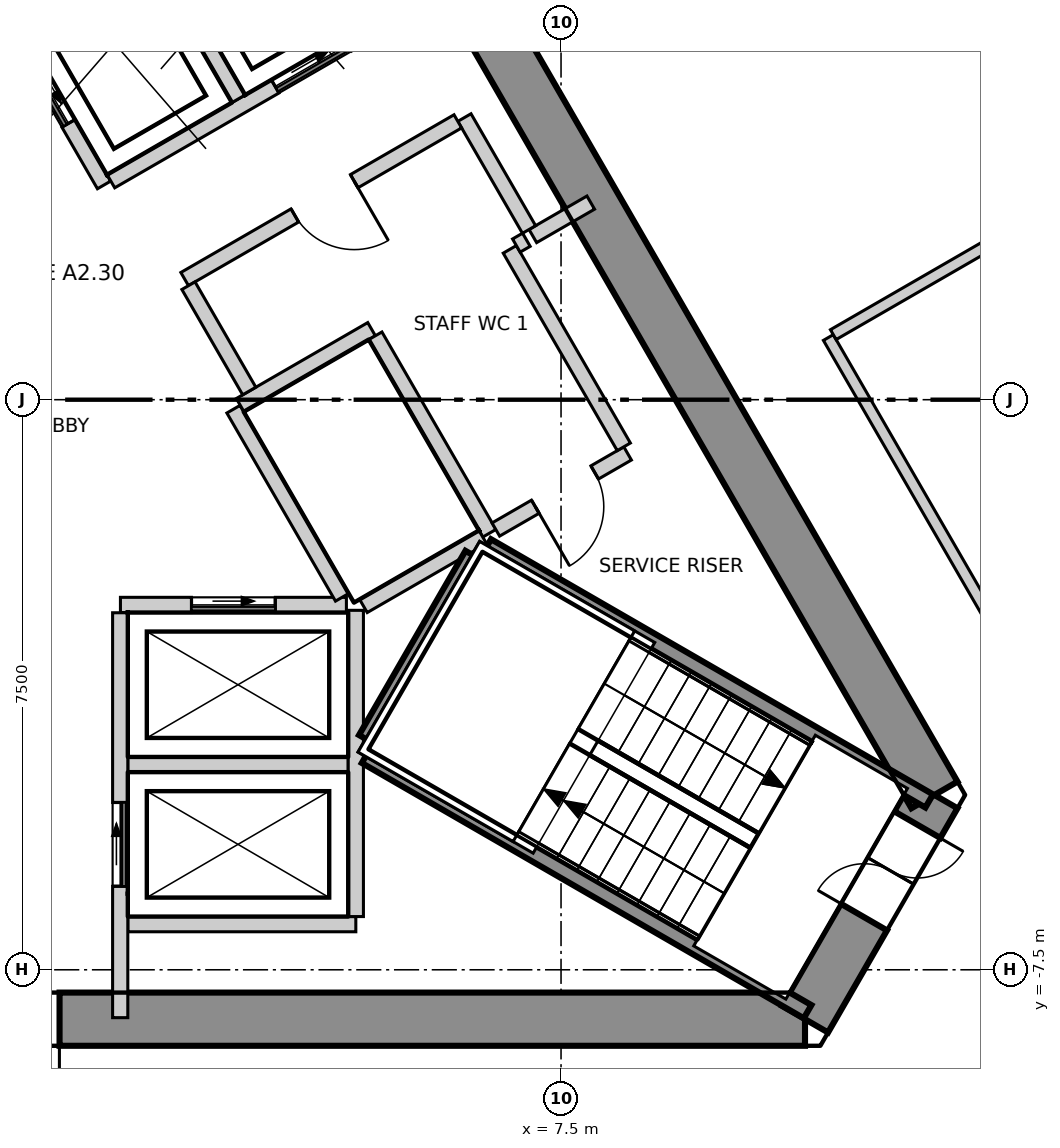
"""IFC4 building model, lengths in metres.
Left out: names, types, materials, properties, quantities, classifications, styles, units other than length and angle.
Written with IfcOpenShell. Run it as: python <this file> out.ifc"""

import sys

from ifc_helpers import new_model, si_unit, direction, frame, frame_2d, origin, place, context, subcontext, project, spatial, polyline, rectangle, outline, extrude, element, fill, save


model = new_model("IFC4")
c1 = context("Model", 3, precision=1e-05, world=origin(), true_north=direction((0.0, 1.0)))
c2 = subcontext(c1, "Body", "Model", "MODEL_VIEW")
j1 = project(units=[si_unit("LENGTHUNIT", "METRE"), si_unit("PLANEANGLEUNIT", "RADIAN")], contexts=[c1])
p1 = place(None, origin())
s1 = spatial("IfcSite", under=j1, at=p1, CompositionType="ELEMENT")
p2 = place(p1, origin())
s2 = spatial("IfcBuilding", under=s1, at=p2, CompositionType="ELEMENT")
p3 = place(p2, frame((0.0, 0.0, 255.8)))
s3 = spatial("IfcBuildingStorey", under=s2, at=p3, CompositionType="ELEMENT", Elevation=255.8)
p4 = place(p3, frame((-10.71, -8.15, -0.6), z_axis=(0.0, 0.0, 1.0), x_axis=(1.0, 0.0, 0.0)))
e1 = element("IfcWall", 1, at=p4, inside=s3, PredefinedType="SHEAR", context=c2, shape_type="SweptSolid", body=[
    extrude(outline(polyline([(-0.202, -0.35), (1.782, -0.35), (3.766, -0.35), (5.75, -0.35), (7.734, -0.35), (9.718, -0.35), (11.702, -0.35), (13.686, -0.35), (15.67, -0.35), (17.654, -0.35), (19.638, -0.35), (21.622, -0.35), (21.218, 0.35), (19.307, 0.35), (17.397, 0.35), (15.486, 0.35), (13.576, 0.35), (11.665, 0.35), (9.755, 0.35), (7.844, 0.35), (5.934, 0.35), (4.023, 0.35), (2.113, 0.35), (0.202, 0.35), (-0.202, -0.35)])), origin(), (0.0, 0.0, 1.0), 6.3),
])
p5 = place(p4, frame((9.81, 0.0, 0.6)))
e2 = element("IfcOpeningElement", 2, at=p5, cuts=e1, PredefinedType="OPENING", context=c2, shape_type="SweptSolid", body=[
    extrude(rectangle(XDim=1.8, YDim=2.1, at=frame_2d((0.9, 1.05))), frame((0.0, 0.36, 0.0), z_axis=(0.0, -1.0, 0.0), x_axis=(1.0, 0.0, 0.0)), (0.0, 0.0, 1.0), 0.72),
])
p6 = place(p3, frame((10.71, -8.15, -0.6), z_axis=(0.0, 0.0, 1.0), x_axis=(0.49999337185, 0.866029230515, 0.0)))
e3 = element("IfcWall", 3, at=p6, inside=s3, PredefinedType="SHEAR", context=c2, shape_type="SweptSolid", body=[
    extrude(outline(polyline([(-0.202, -0.35), (1.703, -0.35), (3.608, -0.35), (3.204, 0.35), (1.703, 0.35), (0.202, 0.35), (-0.202, -0.35)])), origin(), (0.0, 0.0, 1.0), 6.3),
])
p7 = place(p6, frame((1.553, 0.0, 0.6)))
e4 = element("IfcOpeningElement", 4, at=p7, cuts=e3, PredefinedType="OPENING", context=c2, shape_type="SweptSolid", body=[
    extrude(rectangle(XDim=1.4, YDim=2.1, at=frame_2d((0.7, 1.05))), frame((0.0, 0.36, 0.0), z_axis=(0.0, -1.0, 0.0), x_axis=(1.0, 0.0, 0.0)), (0.0, 0.0, 1.0), 0.72),
])
p8 = place(p3, frame((12.413, -5.2, -0.6), z_axis=(0.0, 0.0, 1.0), x_axis=(-0.500011533395, 0.866018744874, 0.0)))
e5 = element("IfcWall", 5, at=p8, inside=s3, PredefinedType="SHEAR", context=c2, shape_type="SweptSolid", body=[
    extrude(outline(polyline([(-0.202, -0.35), (1.782, -0.35), (3.766, -0.35), (5.75, -0.35), (7.734, -0.35), (9.718, -0.35), (11.702, -0.35), (13.686, -0.35), (15.67, -0.35), (17.654, -0.35), (19.638, -0.35), (21.622, -0.35), (21.218, 0.35), (19.307, 0.35), (17.397, 0.35), (15.486, 0.35), (13.576, 0.35), (11.665, 0.35), (9.755, 0.35), (7.844, 0.35), (5.934, 0.35), (4.023, 0.35), (2.113, 0.35), (0.202, 0.35), (-0.202, -0.35)])), origin(), (0.0, 0.0, 1.0), 6.3),
])
p9 = place(p8, frame((16.465, 0.0, 0.6)))
e6 = element("IfcOpeningElement", 6, at=p9, cuts=e5, PredefinedType="OPENING", context=c2, shape_type="SweptSolid", body=[
    extrude(rectangle(XDim=0.9, YDim=2.1, at=frame_2d((0.45, 1.05))), frame((0.0, 0.36, 0.0), z_axis=(0.0, -1.0, 0.0), x_axis=(1.0, 0.0, 0.0)), (0.0, 0.0, 1.0), 0.72),
])
p10 = place(p3, frame((11.017, 0.818, 0.0), z_axis=(0.0, 0.0, 1.0), x_axis=(0.499929268946, -0.866066236526, 0.0)))
e7 = element("IfcWall", 7, at=p10, inside=s3, PredefinedType="PARTITIONING", context=c2, shape_type="SweptSolid", body=[
    extrude(rectangle(XDim=6.949, YDim=0.15, at=frame_2d((3.474, 0.0))), origin(), (0.0, 0.0, 1.0), 5.7),
])
p11 = place(p3, frame((11.082, 0.856, 0.0), z_axis=(0.0, 0.0, 1.0), x_axis=(0.866054133163, 0.499950235956, 0.0)))
e8 = element("IfcWall", 8, at=p11, inside=s3, PredefinedType="PARTITIONING", context=c2, shape_type="SweptSolid", body=[
    extrude(rectangle(XDim=6.897, YDim=0.15, at=frame_2d((3.448, 0.0))), origin(), (0.0, 0.0, 1.0), 5.7),
])
p12 = place(p11, frame((2.811, 0.0, 0.0)))
e9 = element("IfcOpeningElement", 9, at=p12, cuts=e8, PredefinedType="OPENING", context=c2, shape_type="SweptSolid", body=[
    extrude(rectangle(XDim=1.2, YDim=2.1, at=frame_2d((0.6, 1.05))), frame((0.0, 0.085, 0.0), z_axis=(0.0, -1.0, 0.0), x_axis=(1.0, 0.0, 0.0)), (0.0, 0.0, 1.0), 0.17),
])
p13 = place(p3, frame((1.8, -4.8, 0.0), z_axis=(0.0, 0.0, 1.0), x_axis=(1.0, 0.0, 0.0)))
e10 = element("IfcWall", 10, at=p13, inside=s3, PredefinedType="SOLIDWALL", context=c2, shape_type="SweptSolid", body=[
    extrude(rectangle(XDim=2.9, YDim=0.2, at=frame_2d((1.45, 0.0))), origin(), (0.0, 0.0, 1.0), 5.7),
])
p14 = place(p3, frame((1.8, -6.9, 0.0), z_axis=(0.0, 0.0, 1.0), x_axis=(1.0, 0.0, 0.0)))
e11 = element("IfcWall", 11, at=p14, inside=s3, PredefinedType="SOLIDWALL", context=c2, shape_type="SweptSolid", body=[
    extrude(rectangle(XDim=3.0, YDim=0.2, at=frame_2d((1.5, 0.0))), origin(), (0.0, 0.0, 1.0), 5.7),
])
p15 = place(p3, frame((1.703, -2.7, 0.0), z_axis=(0.0, 0.0, 1.0), x_axis=(1.0, 0.0, 0.0)))
e12 = element("IfcWall", 12, at=p15, inside=s3, PredefinedType="SOLIDWALL", context=c2, shape_type="SweptSolid", body=[
    extrude(rectangle(XDim=2.973, YDim=0.2, at=frame_2d((1.487, 0.0))), origin(), (0.0, 0.0, 1.0), 5.7),
])
p16 = place(p15, frame((0.936, 0.0, 0.0)))
e13 = element("IfcOpeningElement", 13, at=p16, cuts=e12, PredefinedType="OPENING", context=c2, shape_type="SweptSolid", body=[
    extrude(rectangle(XDim=1.1, YDim=2.1, at=frame_2d((0.55, 1.05))), frame((0.0, 0.11, 0.0), z_axis=(0.0, -1.0, 0.0), x_axis=(1.0, 0.0, 0.0)), (0.0, 0.0, 1.0), 0.22),
])
p17 = place(p3, frame((0.0, 5.4, 0.0), z_axis=(0.0, 0.0, 1.0), x_axis=(0.500103862429, -0.865965430478, 0.0)))
e14 = element("IfcWall", 14, at=p17, inside=s3, PredefinedType="SOLIDWALL", context=c2, shape_type="SweptSolid", body=[
    extrude(rectangle(XDim=2.973, YDim=0.2, at=frame_2d((1.487, 0.0))), origin(), (0.0, 0.0, 1.0), 5.7),
])
p18 = place(p17, frame((0.937, 0.0, 0.0)))
e15 = element("IfcOpeningElement", 15, at=p18, cuts=e14, PredefinedType="OPENING", context=c2, shape_type="SweptSolid", body=[
    extrude(rectangle(XDim=1.1, YDim=2.1, at=frame_2d((0.55, 1.05))), frame((0.0, 0.11, 0.0), z_axis=(0.0, -1.0, 0.0), x_axis=(1.0, 0.0, 0.0)), (0.0, 0.0, 1.0), 0.22),
])
p19 = place(p3, frame((3.19, -0.125, 0.0), z_axis=(0.0, 0.0, 1.0), x_axis=(0.499988658015, -0.866031951983, 0.0)))
e16 = element("IfcWall", 16, at=p19, inside=s3, PredefinedType="SOLIDWALL", context=c2, shape_type="SweptSolid", body=[
    extrude(rectangle(XDim=2.858, YDim=0.2, at=frame_2d((1.429, 0.0))), origin(), (0.0, 0.0, 1.0), 5.7),
])
p20 = place(p3, frame((1.578, 2.874, 0.0), z_axis=(0.0, 0.0, 1.0), x_axis=(0.866045911672, 0.499964477614, 0.0)))
e17 = element("IfcWall", 17, at=p20, inside=s3, PredefinedType="SOLIDWALL", context=c2, shape_type="SweptSolid", body=[
    extrude(rectangle(XDim=5.327, YDim=0.2, at=frame_2d((2.663, 0.0))), origin(), (0.0, 0.0, 1.0), 5.7),
])
p21 = place(p20, frame((2.496, 0.0, 0.0)))
e18 = element("IfcOpeningElement", 18, at=p21, cuts=e17, PredefinedType="OPENING", context=c2, shape_type="SweptSolid", body=[
    extrude(rectangle(XDim=1.1, YDim=2.1, at=frame_2d((0.55, 1.05))), frame((0.0, 0.11, 0.0), z_axis=(0.0, -1.0, 0.0), x_axis=(1.0, 0.0, 0.0)), (0.0, 0.0, 1.0), 0.22),
])
p22 = place(p3, frame((1.7, -8.13, 0.0), z_axis=(0.0, 0.0, 1.0), x_axis=(0.0, 1.0, 0.0)))
e19 = element("IfcWall", 19, at=p22, inside=s3, PredefinedType="SOLIDWALL", context=c2, shape_type="SweptSolid", body=[
    extrude(rectangle(XDim=5.327, YDim=0.2, at=frame_2d((2.664, 0.0))), origin(), (0.0, 0.0, 1.0), 5.7),
])
p23 = place(p22, frame((1.73, 0.0, 0.0)))
e20 = element("IfcOpeningElement", 20, at=p23, cuts=e19, PredefinedType="OPENING", context=c2, shape_type="SweptSolid", body=[
    extrude(rectangle(XDim=1.1, YDim=2.1, at=frame_2d((0.55, 1.05))), frame((0.0, 0.11, 0.0), z_axis=(0.0, -1.0, 0.0), x_axis=(1.0, 0.0, 0.0)), (0.0, 0.0, 1.0), 0.22),
])
p24 = place(p3, frame((4.8, -6.8, 0.0), z_axis=(0.0, 0.0, 1.0), x_axis=(0.0, 1.0, 0.0)))
e21 = element("IfcWall", 21, at=p24, inside=s3, PredefinedType="SOLIDWALL", context=c2, shape_type="SweptSolid", body=[
    extrude(rectangle(XDim=4.029, YDim=0.2, at=frame_2d((2.015, 0.0))), origin(), (0.0, 0.0, 1.0), 5.7),
])
p25 = place(p3, frame((3.278, -0.071, 0.0), z_axis=(0.0, 0.0, 1.0), x_axis=(0.865855657918, 0.500293893279, 0.0)))
e22 = element("IfcWall", 22, at=p25, inside=s3, PredefinedType="SOLIDWALL", context=c2, shape_type="SweptSolid", body=[
    extrude(rectangle(XDim=1.997, YDim=0.2, at=frame_2d((0.999, 0.0))), origin(), (0.0, 0.0, 1.0), 5.7),
])
p26 = place(p3, frame((7.129, 2.153, 0.0), z_axis=(0.0, 0.0, 1.0), x_axis=(0.866083962871, 0.499898558967, 0.0)))
e23 = element("IfcWall", 23, at=p26, inside=s3, PredefinedType="SOLIDWALL", context=c2, shape_type="SweptSolid", body=[
    extrude(rectangle(XDim=0.88, YDim=0.2, at=frame_2d((0.44, 0.0))), origin(), (0.0, 0.0, 1.0), 5.7),
])
p27 = place(p3, frame((1.807, 6.47, 0.0), z_axis=(0.0, 0.0, 1.0), x_axis=(0.50012328804, -0.865954211699, 0.0)))
e24 = element("IfcWall", 24, at=p27, inside=s3, PredefinedType="SOLIDWALL", context=c2, shape_type="SweptSolid", body=[
    extrude(rectangle(XDim=2.9, YDim=0.2, at=frame_2d((1.45, 0.0))), origin(), (0.0, 0.0, 1.0), 5.7),
])
p28 = place(p3, frame((5.057, 0.841, 0.0), z_axis=(0.0, 0.0, 1.0), x_axis=(0.499990139034, -0.866031096941, 0.0)))
e25 = element("IfcWall", 25, at=p28, inside=s3, PredefinedType="SOLIDWALL", context=c2, shape_type="SweptSolid", body=[
    extrude(rectangle(XDim=3.0, YDim=0.2, at=frame_2d((1.5, 0.0))), origin(), (0.0, 0.0, 1.0), 5.7),
])
p29 = place(p3, frame((4.9, -2.714, 0.0), z_axis=(0.0, 0.0, 1.0), x_axis=(0.865846928409, 0.500309001083, 0.0)))
e26 = element("IfcWall", 26, at=p29, inside=s3, PredefinedType="SOLIDWALL", context=c2, shape_type="SweptSolid", body=[
    extrude(rectangle(XDim=1.813, YDim=0.2, at=frame_2d((0.907, 0.0))), origin(), (0.0, 0.0, 1.0), 5.7),
])
p30 = place(p3, frame((6.229, 3.712, 0.0), z_axis=(0.0, 0.0, 1.0), x_axis=(0.499875724984, -0.86609714211, 0.0)))
e27 = element("IfcWall", 27, at=p30, inside=s3, PredefinedType="SOLIDWALL", context=c2, shape_type="SweptSolid", body=[
    extrude(rectangle(XDim=1.701, YDim=0.2, at=frame_2d((0.85, 0.0))), origin(), (0.0, 0.0, 1.0), 5.7),
])
p31 = place(p3, frame((2.548, 1.587, 0.0), z_axis=(0.0, 0.0, 1.0), x_axis=(0.866004344652, 0.500036473714, 0.0)))
e28 = element("IfcWall", 28, at=p31, inside=s3, PredefinedType="SOLIDWALL", context=c2, shape_type="SweptSolid", body=[
    extrude(rectangle(XDim=4.15, YDim=0.2, at=frame_2d((2.075, 0.0))), origin(), (0.0, 0.0, 1.0), 5.7),
])
p32 = place(p31, frame((1.675, 0.0, 0.0)))
e29 = element("IfcOpeningElement", 29, at=p32, cuts=e28, PredefinedType="OPENING", context=c2, shape_type="SweptSolid", body=[
    extrude(rectangle(XDim=0.9, YDim=2.1, at=frame_2d((0.45, 1.05))), frame((0.0, 0.11, 0.0), z_axis=(0.0, -1.0, 0.0), x_axis=(1.0, 0.0, 0.0)), (0.0, 0.0, 1.0), 0.22),
])
p33 = place(p3, frame((2.598, 1.5, 0.0), z_axis=(0.0, 0.0, 1.0), x_axis=(0.499929347863, -0.866066190972, 0.0)))
e30 = element("IfcWall", 30, at=p33, inside=s3, PredefinedType="SOLIDWALL", context=c2, shape_type="SweptSolid", body=[
    extrude(rectangle(XDim=1.6, YDim=0.2, at=frame_2d((0.8, 0.0))), origin(), (0.0, 0.0, 1.0), 5.7),
])
p34 = place(p3, frame((6.642, -1.708, 0.0), z_axis=(0.0, 0.0, 1.0), x_axis=(0.866043441391, 0.499968756647, 0.0)))
e31 = element("IfcWall", 31, at=p34, inside=s3, PredefinedType="SOLIDWALL", context=c2, shape_type="SweptSolid", body=[
    extrude(rectangle(XDim=2.002, YDim=0.2, at=frame_2d((1.001, 0.0))), origin(), (0.0, 0.0, 1.0), 5.7),
])
p35 = place(p34, frame((0.601, 0.0, 0.0)))
e32 = element("IfcOpeningElement", 32, at=p35, cuts=e31, PredefinedType="OPENING", context=c2, shape_type="SweptSolid", body=[
    extrude(rectangle(XDim=0.9, YDim=2.1, at=frame_2d((0.45, 1.05))), frame((0.0, 0.11, 0.0), z_axis=(0.0, -1.0, 0.0), x_axis=(1.0, 0.0, 0.0)), (0.0, 0.0, 1.0), 0.22),
])
p36 = place(p3, frame((6.826, 1.978, 0.0), z_axis=(0.0, 0.0, 1.0), x_axis=(0.499990139034, -0.866031096941, 0.0)))
e33 = element("IfcWall", 33, at=p36, inside=s3, PredefinedType="SOLIDWALL", context=c2, shape_type="SweptSolid", body=[
    extrude(rectangle(XDim=3.0, YDim=0.2, at=frame_2d((1.5, 0.0))), origin(), (0.0, 0.0, 1.0), 5.7),
])
p37 = place(p3, frame((6.912, 2.028, 0.0), z_axis=(0.0, 0.0, 1.0), x_axis=(0.866559367082, 0.499074005857, 0.0)))
e34 = element("IfcWall", 34, at=p37, inside=s3, PredefinedType="SOLIDWALL", context=c2, shape_type="SweptSolid", body=[
    extrude(rectangle(XDim=0.152, YDim=0.2, at=frame_2d((0.076, 0.0))), origin(), (0.0, 0.0, 1.0), 5.7),
])
p38 = place(p3, frame((4.929, -4.693, 0.0), z_axis=(0.0, 0.0, 1.0), x_axis=(0.865983344943, -0.500072840975, 0.0)))
e35 = element("IfcWall", 35, at=p38, inside=s3, PredefinedType="SOLIDWALL", context=c2, shape_type="SweptSolid", body=[
    extrude(rectangle(XDim=6.715, YDim=0.2, at=frame_2d((3.357, 0.0))), origin(), (0.0, 0.0, 1.0), 5.7),
])
p39 = place(p3, frame((4.929, -4.462, 0.0), z_axis=(0.0, 0.0, 1.0), x_axis=(0.500200581029, 0.865909567298, 0.0)))
e36 = element("IfcWall", 36, at=p39, inside=s3, PredefinedType="SOLIDWALL", context=c2, shape_type="SweptSolid", body=[
    extrude(rectangle(XDim=2.799, YDim=0.2, at=frame_2d((1.399, 0.0))), origin(), (0.0, 0.0, 1.0), 5.7),
])
p40 = place(p3, frame((6.529, -1.922, 0.0), z_axis=(0.0, 0.0, 1.0), x_axis=(0.866046323291, -0.499963764601, 0.0)))
e37 = element("IfcWall", 37, at=p40, inside=s3, PredefinedType="SOLIDWALL", context=c2, shape_type="SweptSolid", body=[
    extrude(rectangle(XDim=6.714, YDim=0.2, at=frame_2d((3.357, 0.0))), origin(), (0.0, 0.0, 1.0), 5.7),
])
p41 = place(p16, origin())
e38 = element("IfcDoor", 38, at=p41, inside=s3, OperationType="SLIDING_TO_LEFT", PredefinedType="DOOR", context=c2, shape_type="SweptSolid", body=[
    extrude(rectangle(XDim=1.1, YDim=2.1, at=frame_2d((0.55, 1.05))), frame((0.0, 0.025, 0.0), z_axis=(0.0, -1.0, 0.0), x_axis=(1.0, 0.0, 0.0)), (0.0, 0.0, 1.0), 0.05),
])
fill(e13, e38)
p42 = place(p23, origin())
e39 = element("IfcDoor", 39, at=p42, inside=s3, OperationType="SLIDING_TO_LEFT", PredefinedType="DOOR", context=c2, shape_type="SweptSolid", body=[
    extrude(rectangle(XDim=1.1, YDim=2.1, at=frame_2d((0.55, 1.05))), frame((0.0, 0.025, 0.0), z_axis=(0.0, -1.0, 0.0), x_axis=(1.0, 0.0, 0.0)), (0.0, 0.0, 1.0), 0.05),
])
fill(e20, e39)
p43 = place(p18, origin())
e40 = element("IfcDoor", 40, at=p43, inside=s3, OperationType="SLIDING_TO_LEFT", PredefinedType="DOOR", context=c2, shape_type="SweptSolid", body=[
    extrude(rectangle(XDim=1.1, YDim=2.1, at=frame_2d((0.55, 1.05))), frame((0.0, 0.025, 0.0), z_axis=(0.0, -1.0, 0.0), x_axis=(1.0, 0.0, 0.0)), (0.0, 0.0, 1.0), 0.05),
])
fill(e15, e40)
p44 = place(p21, origin())
e41 = element("IfcDoor", 41, at=p44, inside=s3, OperationType="SLIDING_TO_LEFT", PredefinedType="DOOR", context=c2, shape_type="SweptSolid", body=[
    extrude(rectangle(XDim=1.1, YDim=2.1, at=frame_2d((0.55, 1.05))), frame((0.0, 0.025, 0.0), z_axis=(0.0, -1.0, 0.0), x_axis=(1.0, 0.0, 0.0)), (0.0, 0.0, 1.0), 0.05),
])
fill(e18, e41)
p45 = place(p5, origin())
e42 = element("IfcDoor", 42, at=p45, inside=s3, OperationType="DOUBLE_DOOR_SINGLE_SWING", PredefinedType="DOOR", context=c2, shape_type="SweptSolid", body=[
    extrude(rectangle(XDim=1.8, YDim=2.1, at=frame_2d((0.9, 1.05))), frame((0.0, 0.025, 0.0), z_axis=(0.0, -1.0, 0.0), x_axis=(1.0, 0.0, 0.0)), (0.0, 0.0, 1.0), 0.05),
])
fill(e2, e42)
p46 = place(p7, origin())
e43 = element("IfcDoor", 43, at=p46, inside=s3, OperationType="DOUBLE_DOOR_SINGLE_SWING", PredefinedType="DOOR", context=c2, shape_type="SweptSolid", body=[
    extrude(rectangle(XDim=1.4, YDim=2.1, at=frame_2d((0.7, 1.05))), frame((0.0, 0.025, 0.0), z_axis=(0.0, -1.0, 0.0), x_axis=(1.0, 0.0, 0.0)), (0.0, 0.0, 1.0), 0.05),
])
fill(e4, e43)
p47 = place(p35, origin())
e44 = element("IfcDoor", 44, at=p47, inside=s3, OperationType="SINGLE_SWING_LEFT", PredefinedType="DOOR", context=c2, shape_type="SweptSolid", body=[
    extrude(rectangle(XDim=0.9, YDim=2.1, at=frame_2d((0.45, 1.05))), frame((0.0, 0.025, 0.0), z_axis=(0.0, -1.0, 0.0), x_axis=(1.0, 0.0, 0.0)), (0.0, 0.0, 1.0), 0.05),
])
fill(e32, e44)
p48 = place(p32, origin())
e45 = element("IfcDoor", 45, at=p48, inside=s3, OperationType="SINGLE_SWING_RIGHT", PredefinedType="DOOR", context=c2, shape_type="SweptSolid", body=[
    extrude(rectangle(XDim=0.9, YDim=2.1, at=frame_2d((0.45, 1.05))), frame((0.0, 0.025, 0.0), z_axis=(0.0, -1.0, 0.0), x_axis=(1.0, 0.0, 0.0)), (0.0, 0.0, 1.0), 0.05),
])
fill(e29, e45)
save(model, sys.argv[1])
